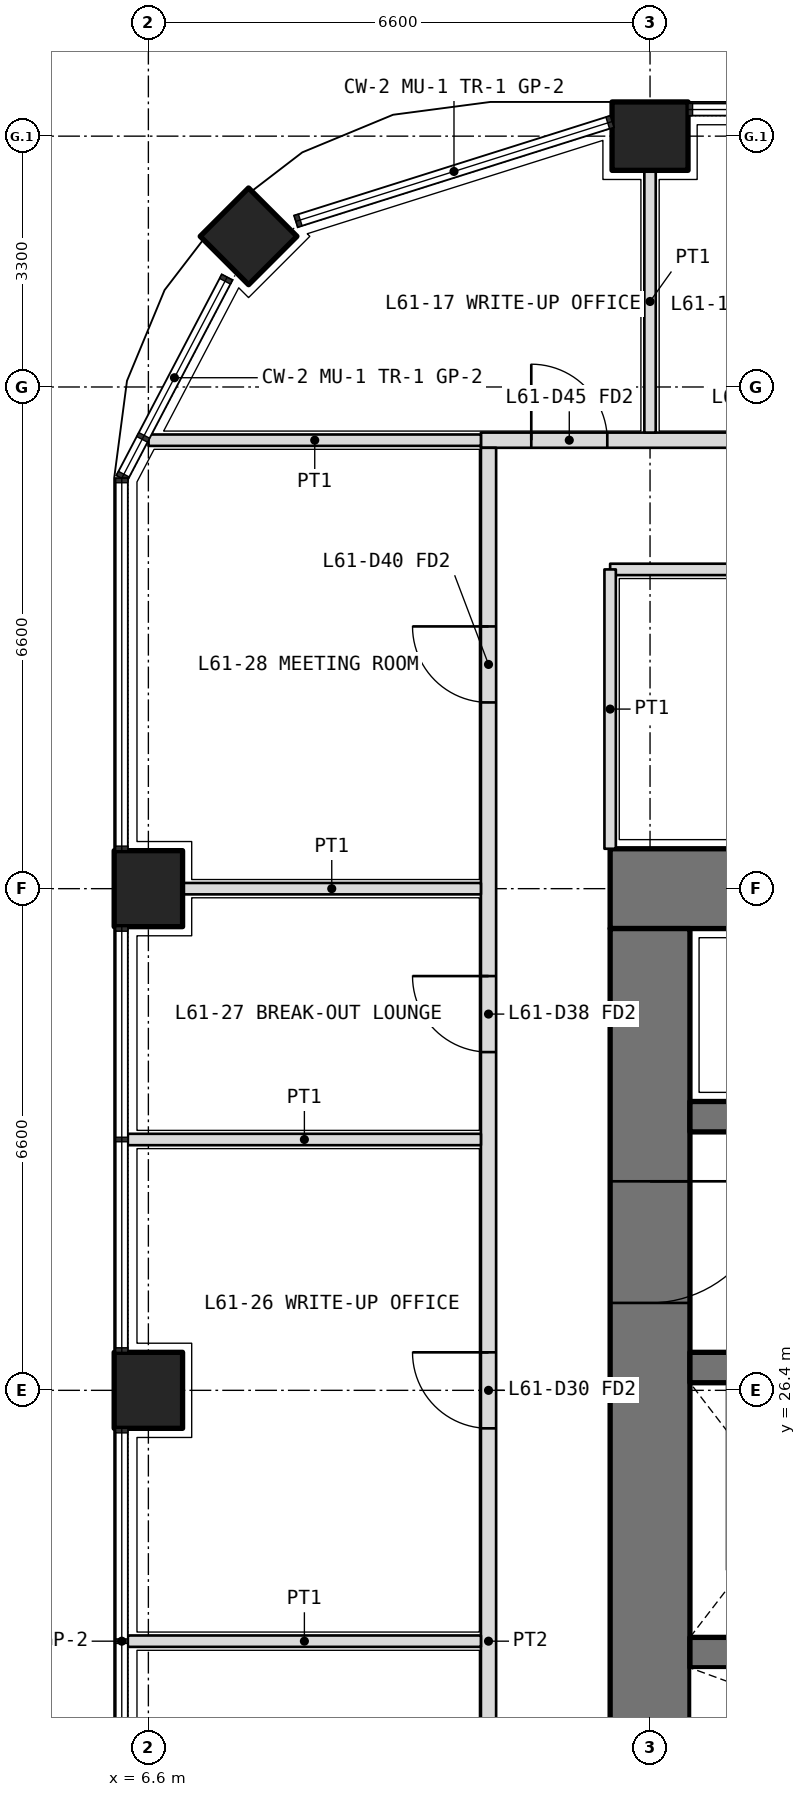
"""IFC4 building model, lengths in metres.
Left out: names, types, materials, properties, quantities, classifications, styles, units other than length and angle.
Written with IfcOpenShell. Run it as: python <this file> out.ifc"""

import sys

from ifc_helpers import new_model, si_unit, direction, frame, frame_2d, origin, origin_2d, place, context, subcontext, project, spatial, rectangle, extrude, element, fill, save


model = new_model("IFC4")
c1 = context("Model", 3, precision=1e-05, world=origin(), true_north=direction((0.0, 1.0)))
c2 = subcontext(c1, "Body", "Model", "MODEL_VIEW")
j1 = project(units=[si_unit("LENGTHUNIT", "METRE"), si_unit("PLANEANGLEUNIT", "RADIAN")], contexts=[c1])
p1 = place(None, origin())
s1 = spatial("IfcSite", under=j1, at=p1, CompositionType="ELEMENT")
p2 = place(p1, origin())
s2 = spatial("IfcBuilding", under=s1, at=p2, CompositionType="ELEMENT")
p3 = place(p2, frame((0.0, 0.0, 267.0)))
s3 = spatial("IfcBuildingStorey", under=s2, at=p3, CompositionType="ELEMENT", Elevation=267.0)
p4 = place(p3, frame((7.918, 41.582, 0.0), z_axis=(0.0, 0.0, 1.0), x_axis=(0.707106781187, 0.707106781187, 0.0)))
e1 = element("IfcColumn", 1, at=p4, inside=s3, PredefinedType="COLUMN", context=c2, shape_type="SweptSolid", body=[
    extrude(rectangle(XDim=0.9, YDim=0.9, at=origin_2d()), origin(), (0.0, 0.0, 1.0), 4.2),
])
for number, where, z_axis, x_axis in (
    (2, (6.6, 26.4, 0.0), (0.0, 0.0, 1.0), (0.0, 1.0, 0.0)),
    (3, (6.6, 33.0, 0.0), (0.0, 0.0, 1.0), (0.0, 1.0, 0.0)),
    (4, (13.2, 42.9, 0.0), (0.0, 0.0, 1.0), (1.0, 0.0, 0.0)),
):
    element("IfcColumn", number, at=place(p3, frame(where, z_axis=z_axis, x_axis=x_axis)), inside=s3, PredefinedType="COLUMN", context=c2, shape_type="SweptSolid", body=[
        extrude(rectangle(XDim=1.0, YDim=0.9, at=origin_2d()), origin(), (0.0, 0.0, 1.0), 4.2),
    ])
p5 = place(p3, frame((40.125, 33.0, 0.0), z_axis=(0.0, 0.0, 1.0), x_axis=(-1.0, 0.0, 0.0)))
e5 = element("IfcWall", 5, at=p5, inside=s3, PredefinedType="SHEAR", context=c2, shape_type="SweptSolid", body=[
    extrude(rectangle(XDim=27.45, YDim=1.05, at=frame_2d((13.725, 0.0))), origin(), (0.0, 0.0, 1.0), 4.2),
])
p6 = place(p3, frame((13.2, 32.475, 0.0), z_axis=(0.0, 0.0, 1.0), x_axis=(0.0, -1.0, 0.0)))
e6 = element("IfcWall", 6, at=p6, inside=s3, PredefinedType="SHEAR", context=c2, shape_type="SweptSolid", body=[
    extrude(rectangle(XDim=18.75, YDim=1.05, at=frame_2d((9.375, 0.0))), origin(), (0.0, 0.0, 1.0), 4.2),
])
p7 = place(p6, frame((14.125, 0.0, 0.0)))
e7 = element("IfcOpeningElement", 7, at=p7, cuts=e6, PredefinedType="OPENING", context=c2, shape_type="SweptSolid", body=[
    extrude(rectangle(XDim=1.6, YDim=2.1, at=frame_2d((0.8, 1.05))), frame((0.0, 0.535, 0.0), z_axis=(0.0, -1.0, 0.0), x_axis=(1.0, 0.0, 0.0)), (0.0, 0.0, 1.0), 1.07),
])
p8 = place(p6, frame((3.325, 0.0, 0.0)))
e8 = element("IfcOpeningElement", 8, at=p8, cuts=e6, PredefinedType="OPENING", context=c2, shape_type="SweptSolid", body=[
    extrude(rectangle(XDim=1.6, YDim=2.1, at=frame_2d((0.8, 1.05))), frame((0.0, 0.535, 0.0), z_axis=(0.0, -1.0, 0.0), x_axis=(1.0, 0.0, 0.0)), (0.0, 0.0, 1.0), 1.07),
])
p9 = place(p3, frame((13.725, 22.95, 0.0), z_axis=(0.0, 0.0, 1.0), x_axis=(1.0, 0.0, 0.0)))
e9 = element("IfcWall", 9, at=p9, inside=s3, PredefinedType="SHEAR", context=c2, shape_type="SweptSolid", body=[
    extrude(rectangle(XDim=25.35, YDim=0.4, at=frame_2d((12.675, 0.0))), origin(), (0.0, 0.0, 1.0), 4.2),
])
p10 = place(p3, frame((13.725, 26.7, 0.0), z_axis=(0.0, 0.0, 1.0), x_axis=(1.0, 0.0, 0.0)))
e10 = element("IfcWall", 10, at=p10, inside=s3, PredefinedType="SHEAR", context=c2, shape_type="SweptSolid", body=[
    extrude(rectangle(XDim=25.35, YDim=0.4, at=frame_2d((12.675, 0.0))), origin(), (0.0, 0.0, 1.0), 4.2),
])
p11 = place(p10, frame((23.95, 0.0, 0.0)))
e11 = element("IfcOpeningElement", 11, at=p11, cuts=e10, PredefinedType="OPENING", context=c2, shape_type="SweptSolid", body=[
    extrude(rectangle(XDim=1.2, YDim=2.1, at=frame_2d((0.6, 1.05))), frame((0.0, 0.21, 0.0), z_axis=(0.0, -1.0, 0.0), x_axis=(1.0, 0.0, 0.0)), (0.0, 0.0, 1.0), 0.42),
])
p12 = place(p10, frame((0.738, 0.0, 0.0)))
e12 = element("IfcOpeningElement", 12, at=p12, cuts=e10, PredefinedType="OPENING", context=c2, shape_type="SweptSolid", body=[
    extrude(rectangle(XDim=1.1, YDim=2.1, at=frame_2d((0.55, 1.05))), frame((0.0, 0.21, 0.0), z_axis=(0.0, -1.0, 0.0), x_axis=(1.0, 0.0, 0.0)), (0.0, 0.0, 1.0), 0.42),
])
p13 = place(p10, frame((3.925, 0.0, 0.0)))
e13 = element("IfcOpeningElement", 13, at=p13, cuts=e10, PredefinedType="OPENING", context=c2, shape_type="SweptSolid", body=[
    extrude(rectangle(XDim=1.1, YDim=2.1, at=frame_2d((0.55, 1.05))), frame((0.0, 0.21, 0.0), z_axis=(0.0, -1.0, 0.0), x_axis=(1.0, 0.0, 0.0)), (0.0, 0.0, 1.0), 0.42),
])
p14 = place(p10, frame((7.175, 0.0, 0.0)))
e14 = element("IfcOpeningElement", 14, at=p14, cuts=e10, PredefinedType="OPENING", context=c2, shape_type="SweptSolid", body=[
    extrude(rectangle(XDim=1.1, YDim=2.1, at=frame_2d((0.55, 1.05))), frame((0.0, 0.21, 0.0), z_axis=(0.0, -1.0, 0.0), x_axis=(1.0, 0.0, 0.0)), (0.0, 0.0, 1.0), 0.42),
])
p15 = place(p10, frame((10.425, 0.0, 0.0)))
e15 = element("IfcOpeningElement", 15, at=p15, cuts=e10, PredefinedType="OPENING", context=c2, shape_type="SweptSolid", body=[
    extrude(rectangle(XDim=1.1, YDim=2.1, at=frame_2d((0.55, 1.05))), frame((0.0, 0.21, 0.0), z_axis=(0.0, -1.0, 0.0), x_axis=(1.0, 0.0, 0.0)), (0.0, 0.0, 1.0), 0.42),
])
p16 = place(p10, frame((13.775, 0.0, 0.0)))
e16 = element("IfcOpeningElement", 16, at=p16, cuts=e10, PredefinedType="OPENING", context=c2, shape_type="SweptSolid", body=[
    extrude(rectangle(XDim=1.1, YDim=2.1, at=frame_2d((0.55, 1.05))), frame((0.0, 0.21, 0.0), z_axis=(0.0, -1.0, 0.0), x_axis=(1.0, 0.0, 0.0)), (0.0, 0.0, 1.0), 0.42),
])
p17 = place(p3, frame((13.725, 30.0, 0.0), z_axis=(0.0, 0.0, 1.0), x_axis=(1.0, 0.0, 0.0)))
e17 = element("IfcWall", 17, at=p17, inside=s3, PredefinedType="SHEAR", context=c2, shape_type="SweptSolid", body=[
    extrude(rectangle(XDim=25.35, YDim=0.4, at=frame_2d((12.675, 0.0))), origin(), (0.0, 0.0, 1.0), 4.2),
])
p18 = place(p17, frame((0.837, 0.0, 0.0)))
e18 = element("IfcOpeningElement", 18, at=p18, cuts=e17, PredefinedType="OPENING", context=c2, shape_type="SweptSolid", body=[
    extrude(rectangle(XDim=1.0, YDim=2.1, at=frame_2d((0.5, 1.05))), frame((0.0, 0.21, 0.0), z_axis=(0.0, -1.0, 0.0), x_axis=(1.0, 0.0, 0.0)), (0.0, 0.0, 1.0), 0.42),
])
p19 = place(p17, frame((3.925, 0.0, 0.0)))
e19 = element("IfcOpeningElement", 19, at=p19, cuts=e17, PredefinedType="OPENING", context=c2, shape_type="SweptSolid", body=[
    extrude(rectangle(XDim=1.0, YDim=2.1, at=frame_2d((0.5, 1.05))), frame((0.0, 0.21, 0.0), z_axis=(0.0, -1.0, 0.0), x_axis=(1.0, 0.0, 0.0)), (0.0, 0.0, 1.0), 0.42),
])
p20 = place(p17, frame((7.225, 0.0, 0.0)))
e20 = element("IfcOpeningElement", 20, at=p20, cuts=e17, PredefinedType="OPENING", context=c2, shape_type="SweptSolid", body=[
    extrude(rectangle(XDim=1.0, YDim=2.1, at=frame_2d((0.5, 1.05))), frame((0.0, 0.21, 0.0), z_axis=(0.0, -1.0, 0.0), x_axis=(1.0, 0.0, 0.0)), (0.0, 0.0, 1.0), 0.42),
])
p21 = place(p17, frame((10.525, 0.0, 0.0)))
e21 = element("IfcOpeningElement", 21, at=p21, cuts=e17, PredefinedType="OPENING", context=c2, shape_type="SweptSolid", body=[
    extrude(rectangle(XDim=1.0, YDim=2.1, at=frame_2d((0.5, 1.05))), frame((0.0, 0.21, 0.0), z_axis=(0.0, -1.0, 0.0), x_axis=(1.0, 0.0, 0.0)), (0.0, 0.0, 1.0), 0.42),
])
p22 = place(p17, frame((13.775, 0.0, 0.0)))
e22 = element("IfcOpeningElement", 22, at=p22, cuts=e17, PredefinedType="OPENING", context=c2, shape_type="SweptSolid", body=[
    extrude(rectangle(XDim=1.1, YDim=2.1, at=frame_2d((0.55, 1.05))), frame((0.0, 0.21, 0.0), z_axis=(0.0, -1.0, 0.0), x_axis=(1.0, 0.0, 0.0)), (0.0, 0.0, 1.0), 0.42),
])
p23 = place(p17, frame((17.075, 0.0, 0.0)))
e23 = element("IfcOpeningElement", 23, at=p23, cuts=e17, PredefinedType="OPENING", context=c2, shape_type="SweptSolid", body=[
    extrude(rectangle(XDim=1.1, YDim=2.1, at=frame_2d((0.55, 1.05))), frame((0.0, 0.21, 0.0), z_axis=(0.0, -1.0, 0.0), x_axis=(1.0, 0.0, 0.0)), (0.0, 0.0, 1.0), 0.42),
])
p24 = place(p17, frame((20.375, 0.0, 0.0)))
e24 = element("IfcOpeningElement", 24, at=p24, cuts=e17, PredefinedType="OPENING", context=c2, shape_type="SweptSolid", body=[
    extrude(rectangle(XDim=1.1, YDim=2.1, at=frame_2d((0.55, 1.05))), frame((0.0, 0.21, 0.0), z_axis=(0.0, -1.0, 0.0), x_axis=(1.0, 0.0, 0.0)), (0.0, 0.0, 1.0), 0.42),
])
p25 = place(p17, frame((23.462, 0.0, 0.0)))
e25 = element("IfcOpeningElement", 25, at=p25, cuts=e17, PredefinedType="OPENING", context=c2, shape_type="SweptSolid", body=[
    extrude(rectangle(XDim=1.1, YDim=2.1, at=frame_2d((0.55, 1.05))), frame((0.0, 0.21, 0.0), z_axis=(0.0, -1.0, 0.0), x_axis=(1.0, 0.0, 0.0)), (0.0, 0.0, 1.0), 0.42),
])
p26 = place(p3, frame((12.675, 37.2, 0.0), z_axis=(0.0, 0.0, 1.0), x_axis=(1.0, 0.0, 0.0)))
e26 = element("IfcWall", 26, at=p26, inside=s3, PredefinedType="PARTITIONING", context=c2, shape_type="SweptSolid", body=[
    extrude(rectangle(XDim=27.45, YDim=0.15, at=frame_2d((13.725, 0.0))), origin(), (0.0, 0.0, 1.0), 3.0),
])
p27 = place(p26, frame((4.712, 0.0, 0.0)))
e27 = element("IfcOpeningElement", 27, at=p27, cuts=e26, PredefinedType="OPENING", context=c2, shape_type="SweptSolid", body=[
    extrude(rectangle(XDim=1.0, YDim=2.1, at=frame_2d((0.5, 1.05))), frame((0.0, 0.085, 0.0), z_axis=(0.0, -1.0, 0.0), x_axis=(1.0, 0.0, 0.0)), (0.0, 0.0, 1.0), 0.17),
])
p28 = place(p26, frame((11.575, 0.0, 0.0)))
e28 = element("IfcOpeningElement", 28, at=p28, cuts=e26, PredefinedType="OPENING", context=c2, shape_type="SweptSolid", body=[
    extrude(rectangle(XDim=1.0, YDim=2.1, at=frame_2d((0.5, 1.05))), frame((0.0, 0.085, 0.0), z_axis=(0.0, -1.0, 0.0), x_axis=(1.0, 0.0, 0.0)), (0.0, 0.0, 1.0), 0.17),
])
p29 = place(p26, frame((18.175, 0.0, 0.0)))
e29 = element("IfcOpeningElement", 29, at=p29, cuts=e26, PredefinedType="OPENING", context=c2, shape_type="SweptSolid", body=[
    extrude(rectangle(XDim=1.0, YDim=2.1, at=frame_2d((0.5, 1.05))), frame((0.0, 0.085, 0.0), z_axis=(0.0, -1.0, 0.0), x_axis=(1.0, 0.0, 0.0)), (0.0, 0.0, 1.0), 0.17),
])
p30 = place(p26, frame((25.038, 0.0, 0.0)))
e30 = element("IfcOpeningElement", 30, at=p30, cuts=e26, PredefinedType="OPENING", context=c2, shape_type="SweptSolid", body=[
    extrude(rectangle(XDim=1.0, YDim=2.1, at=frame_2d((0.5, 1.05))), frame((0.0, 0.085, 0.0), z_axis=(0.0, -1.0, 0.0), x_axis=(1.0, 0.0, 0.0)), (0.0, 0.0, 1.0), 0.17),
])
p31 = place(p3, frame((12.675, 33.525, 0.0), z_axis=(0.0, 0.0, 1.0), x_axis=(0.0, 1.0, 0.0)))
e31 = element("IfcWall", 31, at=p31, inside=s3, PredefinedType="PARTITIONING", context=c2, shape_type="SweptSolid", body=[
    extrude(rectangle(XDim=3.675, YDim=0.15, at=frame_2d((1.837, 0.0))), origin(), (0.0, 0.0, 1.0), 3.0),
])
p32 = place(p3, frame((10.975, 38.9, 0.0), z_axis=(0.0, 0.0, 1.0), x_axis=(1.0, 0.0, 0.0)))
e32 = element("IfcWall", 32, at=p32, inside=s3, PredefinedType="PARTITIONING", context=c2, shape_type="SweptSolid", body=[
    extrude(rectangle(XDim=30.85, YDim=0.2, at=frame_2d((15.425, 0.0))), origin(), (0.0, 0.0, 1.0), 3.0),
])
p33 = place(p32, frame((0.663, 0.0, 0.0)))
e33 = element("IfcOpeningElement", 33, at=p33, cuts=e32, PredefinedType="OPENING", context=c2, shape_type="SweptSolid", body=[
    extrude(rectangle(XDim=1.0, YDim=2.1, at=frame_2d((0.5, 1.05))), frame((0.0, 0.11, 0.0), z_axis=(0.0, -1.0, 0.0), x_axis=(1.0, 0.0, 0.0)), (0.0, 0.0, 1.0), 0.22),
])
p34 = place(p32, frame((3.375, 0.0, 0.0)))
e34 = element("IfcOpeningElement", 34, at=p34, cuts=e32, PredefinedType="OPENING", context=c2, shape_type="SweptSolid", body=[
    extrude(rectangle(XDim=1.0, YDim=2.1, at=frame_2d((0.5, 1.05))), frame((0.0, 0.11, 0.0), z_axis=(0.0, -1.0, 0.0), x_axis=(1.0, 0.0, 0.0)), (0.0, 0.0, 1.0), 0.22),
])
p35 = place(p32, frame((8.325, 0.0, 0.0)))
e35 = element("IfcOpeningElement", 35, at=p35, cuts=e32, PredefinedType="OPENING", context=c2, shape_type="SweptSolid", body=[
    extrude(rectangle(XDim=1.0, YDim=2.1, at=frame_2d((0.5, 1.05))), frame((0.0, 0.11, 0.0), z_axis=(0.0, -1.0, 0.0), x_axis=(1.0, 0.0, 0.0)), (0.0, 0.0, 1.0), 0.22),
])
p36 = place(p32, frame((13.275, 0.0, 0.0)))
e36 = element("IfcOpeningElement", 36, at=p36, cuts=e32, PredefinedType="OPENING", context=c2, shape_type="SweptSolid", body=[
    extrude(rectangle(XDim=1.0, YDim=2.1, at=frame_2d((0.5, 1.05))), frame((0.0, 0.11, 0.0), z_axis=(0.0, -1.0, 0.0), x_axis=(1.0, 0.0, 0.0)), (0.0, 0.0, 1.0), 0.22),
])
p37 = place(p32, frame((22.587, 0.0, 0.0)))
e37 = element("IfcOpeningElement", 37, at=p37, cuts=e32, PredefinedType="OPENING", context=c2, shape_type="SweptSolid", body=[
    extrude(rectangle(XDim=1.0, YDim=2.1, at=frame_2d((0.5, 1.05))), frame((0.0, 0.11, 0.0), z_axis=(0.0, -1.0, 0.0), x_axis=(1.0, 0.0, 0.0)), (0.0, 0.0, 1.0), 0.22),
])
p38 = place(p3, frame((11.075, 7.4, 0.0), z_axis=(0.0, 0.0, 1.0), x_axis=(0.0, 1.0, 0.0)))
e38 = element("IfcWall", 38, at=p38, inside=s3, PredefinedType="PARTITIONING", context=c2, shape_type="SweptSolid", body=[
    extrude(rectangle(XDim=31.4, YDim=0.2, at=frame_2d((15.7, 0.0))), origin(), (0.0, 0.0, 1.0), 3.0),
])
p39 = place(p38, frame((2.35, 0.0, 0.0)))
e39 = element("IfcOpeningElement", 39, at=p39, cuts=e38, PredefinedType="OPENING", context=c2, shape_type="SweptSolid", body=[
    extrude(rectangle(XDim=1.0, YDim=2.1, at=frame_2d((0.5, 1.05))), frame((0.0, 0.11, 0.0), z_axis=(0.0, -1.0, 0.0), x_axis=(1.0, 0.0, 0.0)), (0.0, 0.0, 1.0), 0.22),
])
p40 = place(p38, frame((6.35, 0.0, 0.0)))
e40 = element("IfcOpeningElement", 40, at=p40, cuts=e38, PredefinedType="OPENING", context=c2, shape_type="SweptSolid", body=[
    extrude(rectangle(XDim=1.0, YDim=2.1, at=frame_2d((0.5, 1.05))), frame((0.0, 0.11, 0.0), z_axis=(0.0, -1.0, 0.0), x_axis=(1.0, 0.0, 0.0)), (0.0, 0.0, 1.0), 0.22),
])
p41 = place(p38, frame((9.45, 0.0, 0.0)))
e41 = element("IfcOpeningElement", 41, at=p41, cuts=e38, PredefinedType="OPENING", context=c2, shape_type="SweptSolid", body=[
    extrude(rectangle(XDim=0.9, YDim=2.1, at=frame_2d((0.45, 1.05))), frame((0.0, 0.11, 0.0), z_axis=(0.0, -1.0, 0.0), x_axis=(1.0, 0.0, 0.0)), (0.0, 0.0, 1.0), 0.22),
])
p42 = place(p38, frame((13.35, 0.0, 0.0)))
e42 = element("IfcOpeningElement", 42, at=p42, cuts=e38, PredefinedType="OPENING", context=c2, shape_type="SweptSolid", body=[
    extrude(rectangle(XDim=0.9, YDim=2.1, at=frame_2d((0.45, 1.05))), frame((0.0, 0.11, 0.0), z_axis=(0.0, -1.0, 0.0), x_axis=(1.0, 0.0, 0.0)), (0.0, 0.0, 1.0), 0.22),
])
p43 = place(p38, frame((18.5, 0.0, 0.0)))
e43 = element("IfcOpeningElement", 43, at=p43, cuts=e38, PredefinedType="OPENING", context=c2, shape_type="SweptSolid", body=[
    extrude(rectangle(XDim=1.0, YDim=2.1, at=frame_2d((0.5, 1.05))), frame((0.0, 0.11, 0.0), z_axis=(0.0, -1.0, 0.0), x_axis=(1.0, 0.0, 0.0)), (0.0, 0.0, 1.0), 0.22),
])
p44 = place(p38, frame((23.45, 0.0, 0.0)))
e44 = element("IfcOpeningElement", 44, at=p44, cuts=e38, PredefinedType="OPENING", context=c2, shape_type="SweptSolid", body=[
    extrude(rectangle(XDim=1.0, YDim=2.1, at=frame_2d((0.5, 1.05))), frame((0.0, 0.11, 0.0), z_axis=(0.0, -1.0, 0.0), x_axis=(1.0, 0.0, 0.0)), (0.0, 0.0, 1.0), 0.22),
])
p45 = place(p38, frame((28.05, 0.0, 0.0)))
e45 = element("IfcOpeningElement", 45, at=p45, cuts=e38, PredefinedType="OPENING", context=c2, shape_type="SweptSolid", body=[
    extrude(rectangle(XDim=1.0, YDim=2.1, at=frame_2d((0.5, 1.05))), frame((0.0, 0.11, 0.0), z_axis=(0.0, -1.0, 0.0), x_axis=(1.0, 0.0, 0.0)), (0.0, 0.0, 1.0), 0.22),
])
p46 = place(p3, frame((6.603, 38.9, 0.0), z_axis=(0.0, 0.0, 1.0), x_axis=(1.0, 0.0, 0.0)))
e46 = element("IfcWall", 46, at=p46, inside=s3, PredefinedType="PARTITIONING", context=c2, shape_type="SweptSolid", body=[
    extrude(rectangle(XDim=4.373, YDim=0.15, at=frame_2d((2.186, 0.0))), origin(), (0.0, 0.0, 1.0), 2.7),
])
p47 = place(p3, frame((13.2, 42.45, 0.0), z_axis=(0.0, 0.0, 1.0), x_axis=(0.0, -1.0, 0.0)))
e47 = element("IfcWall", 47, at=p47, inside=s3, PredefinedType="PARTITIONING", context=c2, shape_type="SweptSolid", body=[
    extrude(rectangle(XDim=3.45, YDim=0.15, at=frame_2d((1.725, 0.0))), origin(), (0.0, 0.0, 1.0), 3.0),
])
for number, where, z_axis, x_axis in (
    (48, (6.33, 23.1, 0.0), (0.0, 0.0, 1.0), (1.0, 0.0, 0.0)),
    (49, (6.33, 29.7, 0.0), (0.0, 0.0, 1.0), (1.0, 0.0, 0.0)),
):
    element("IfcWall", number, at=place(p3, frame(where, z_axis=z_axis, x_axis=x_axis)), inside=s3, PredefinedType="PARTITIONING", context=c2, shape_type="SweptSolid", body=[
        extrude(rectangle(XDim=4.645, YDim=0.15, at=frame_2d((2.323, 0.0))), origin(), (0.0, 0.0, 1.0), 2.7),
    ])
p48 = place(p3, frame((7.05, 33.0, 0.0), z_axis=(0.0, 0.0, 1.0), x_axis=(1.0, 0.0, 0.0)))
e50 = element("IfcWall", 50, at=p48, inside=s3, PredefinedType="PARTITIONING", context=c2, shape_type="SweptSolid", body=[
    extrude(rectangle(XDim=3.925, YDim=0.15, at=frame_2d((1.962, 0.0))), origin(), (0.0, 0.0, 1.0), 3.0),
])
p49 = place(p33, origin())
e51 = element("IfcDoor", 51, at=p49, inside=s3, OperationType="SINGLE_SWING_LEFT", PredefinedType="DOOR", context=c2, shape_type="SweptSolid", body=[
    extrude(rectangle(XDim=1.0, YDim=2.1, at=frame_2d((0.5, 1.05))), frame((0.0, 0.025, 0.0), z_axis=(0.0, -1.0, 0.0), x_axis=(1.0, 0.0, 0.0)), (0.0, 0.0, 1.0), 0.05),
])
fill(e33, e51)
p50 = place(p43, origin())
e52 = element("IfcDoor", 52, at=p50, inside=s3, OperationType="SINGLE_SWING_RIGHT", PredefinedType="DOOR", context=c2, shape_type="SweptSolid", body=[
    extrude(rectangle(XDim=1.0, YDim=2.1, at=frame_2d((0.5, 1.05))), frame((0.0, 0.025, 0.0), z_axis=(0.0, -1.0, 0.0), x_axis=(1.0, 0.0, 0.0)), (0.0, 0.0, 1.0), 0.05),
])
fill(e43, e52)
p51 = place(p44, origin())
e53 = element("IfcDoor", 53, at=p51, inside=s3, OperationType="SINGLE_SWING_RIGHT", PredefinedType="DOOR", context=c2, shape_type="SweptSolid", body=[
    extrude(rectangle(XDim=1.0, YDim=2.1, at=frame_2d((0.5, 1.05))), frame((0.0, 0.025, 0.0), z_axis=(0.0, -1.0, 0.0), x_axis=(1.0, 0.0, 0.0)), (0.0, 0.0, 1.0), 0.05),
])
fill(e44, e53)
p52 = place(p45, origin())
e54 = element("IfcDoor", 54, at=p52, inside=s3, OperationType="SINGLE_SWING_RIGHT", PredefinedType="DOOR", context=c2, shape_type="SweptSolid", body=[
    extrude(rectangle(XDim=1.0, YDim=2.1, at=frame_2d((0.5, 1.05))), frame((0.0, 0.025, 0.0), z_axis=(0.0, -1.0, 0.0), x_axis=(1.0, 0.0, 0.0)), (0.0, 0.0, 1.0), 0.05),
])
fill(e45, e54)
p53 = place(p8, origin())
e55 = element("IfcDoor", 55, at=p53, inside=s3, OperationType="DOUBLE_DOOR_DOUBLE_SWING", PredefinedType="DOOR", context=c2, shape_type="SweptSolid", body=[
    extrude(rectangle(XDim=1.6, YDim=2.1, at=frame_2d((0.8, 1.05))), frame((0.0, 0.025, 0.0), z_axis=(0.0, -1.0, 0.0), x_axis=(1.0, 0.0, 0.0)), (0.0, 0.0, 1.0), 0.05),
])
fill(e8, e55)
save(model, sys.argv[1])
